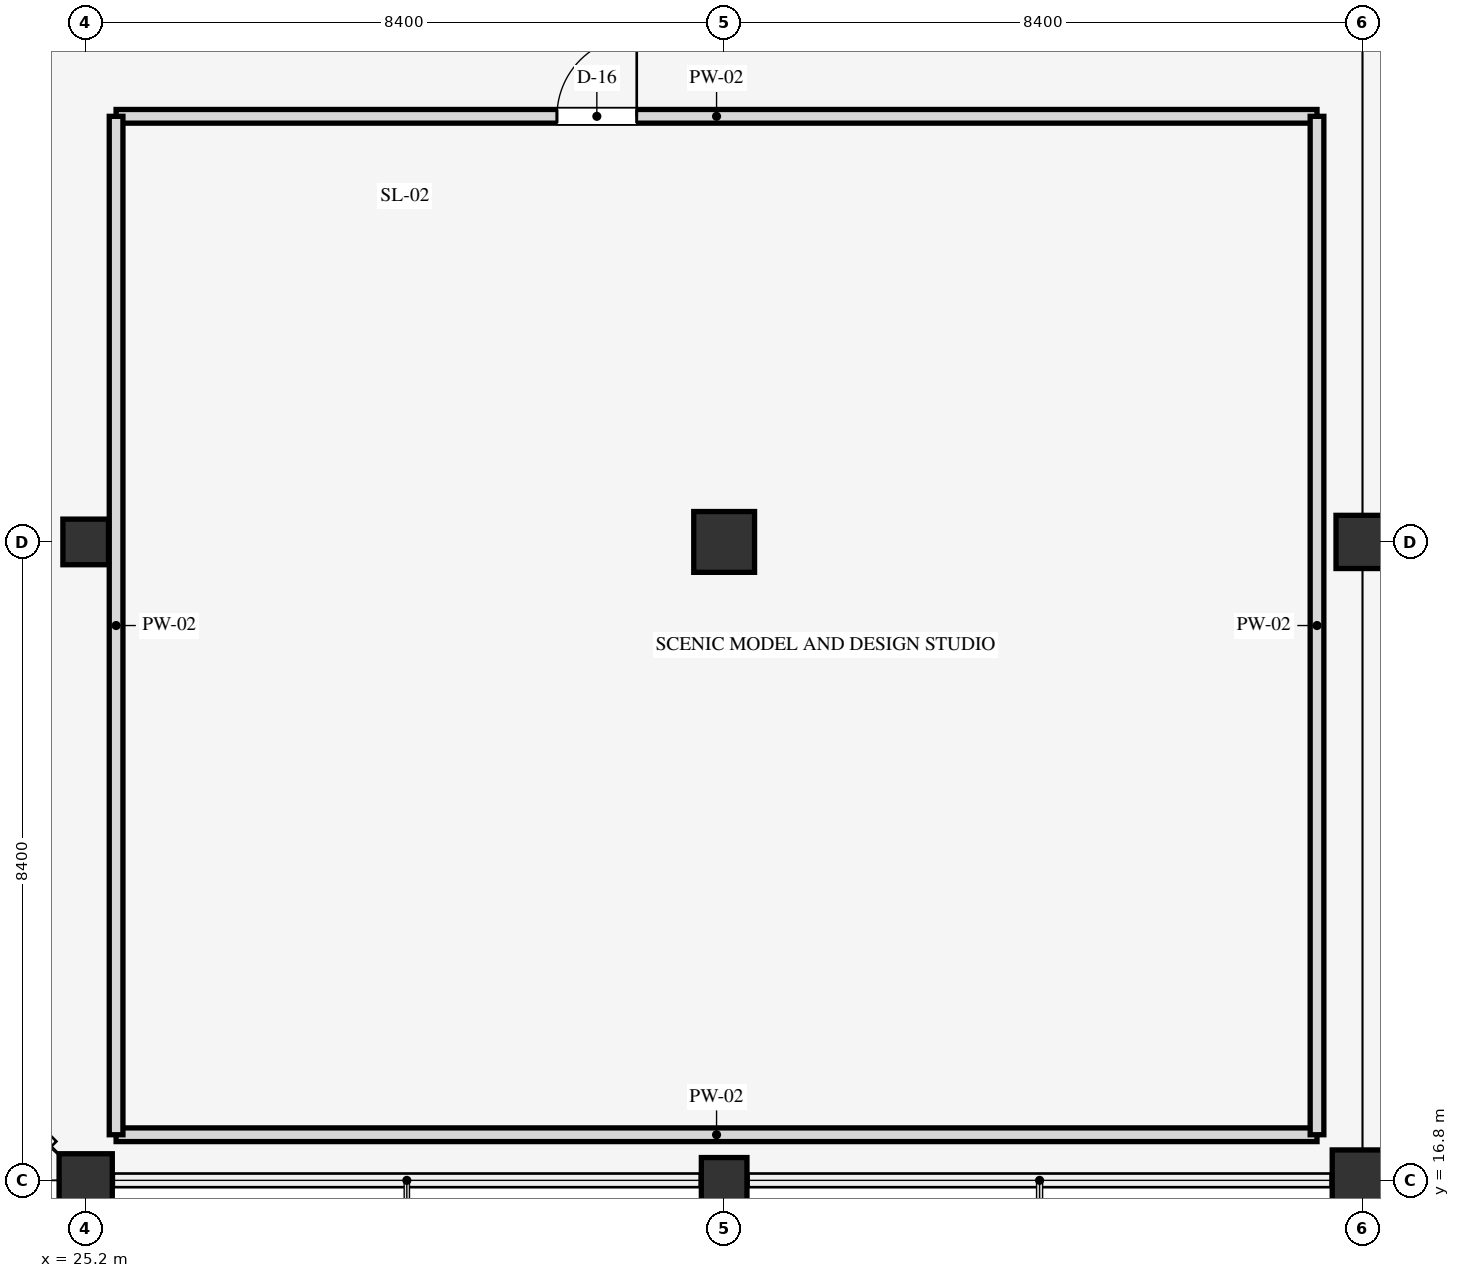
"""IFC4 building model, lengths in metres.
Left out: names, types, materials, properties, quantities, classifications, styles, units other than length and angle.
Written with IfcOpenShell. Run it as: python <this file> out.ifc"""

import sys

from ifc_helpers import new_model, si_unit, direction, frame, frame_2d, origin, origin_2d, place, context, subcontext, project, spatial, rectangle, extrude, element, fill, save


model = new_model("IFC4")
c1 = context("Model", 3, precision=1e-05, world=origin(), true_north=direction((0.0, 1.0)))
c2 = subcontext(c1, "Body", "Model", "MODEL_VIEW")
j1 = project(units=[si_unit("LENGTHUNIT", "METRE"), si_unit("PLANEANGLEUNIT", "RADIAN")], contexts=[c1])
p1 = place(None, origin())
s1 = spatial("IfcSite", under=j1, at=p1, CompositionType="ELEMENT")
p2 = place(p1, origin())
s2 = spatial("IfcBuilding", under=s1, at=p2, CompositionType="ELEMENT")
p3 = place(p2, frame((0.0, 0.0, 18.9)))
s3 = spatial("IfcBuildingStorey", under=s2, at=p3, CompositionType="ELEMENT", Elevation=18.9)
p4 = place(p3, frame((25.2, 16.8, 0.0), z_axis=(0.0, 0.0, 1.0), x_axis=(1.0, 0.0, 0.0)))
e1 = element("IfcColumn", 1, at=p4, inside=s3, PredefinedType="COLUMN", context=c2, shape_type="SweptSolid", body=[
    extrude(rectangle(XDim=0.7, YDim=0.7, at=origin_2d()), origin(), (0.0, 0.0, 1.0), 4.5),
])
for number, where, z_axis, x_axis in (
    (2, (25.2, 25.2, 0.0), (0.0, 0.0, 1.0), (1.0, 0.0, 0.0)),
    (3, (33.6, 16.8, 0.0), (0.0, 0.0, 1.0), (1.0, 0.0, 0.0)),
):
    element("IfcColumn", number, at=place(p3, frame(where, z_axis=z_axis, x_axis=x_axis)), inside=s3, PredefinedType="COLUMN", context=c2, shape_type="SweptSolid", body=[
        extrude(rectangle(XDim=0.6, YDim=0.6, at=origin_2d()), origin(), (0.0, 0.0, 1.0), 4.5),
    ])
for number, where, z_axis, x_axis in (
    (4, (33.6, 25.2, 0.0), (0.0, 0.0, 1.0), (1.0, 0.0, 0.0)),
    (5, (42.0, 16.8, 0.0), (0.0, 0.0, 1.0), (1.0, 0.0, 0.0)),
):
    element("IfcColumn", number, at=place(p3, frame(where, z_axis=z_axis, x_axis=x_axis)), inside=s3, PredefinedType="COLUMN", context=c2, shape_type="SweptSolid", body=[
        extrude(rectangle(XDim=0.8, YDim=0.8, at=origin_2d()), origin(), (0.0, 0.0, 1.0), 4.5),
    ])
p5 = place(p3, frame((42.0, 25.2, 0.0), z_axis=(0.0, 0.0, 1.0), x_axis=(1.0, 0.0, 0.0)))
e6 = element("IfcColumn", 6, at=p5, inside=s3, PredefinedType="COLUMN", context=c2, shape_type="SweptSolid", body=[
    extrude(rectangle(XDim=0.7, YDim=0.7, at=origin_2d()), origin(), (0.0, 0.0, 1.0), 4.5),
])
p6 = place(p3, frame((25.6, 17.4, 0.0), z_axis=(0.0, 0.0, 1.0), x_axis=(1.0, 0.0, 0.0)))
e7 = element("IfcWall", 7, at=p6, inside=s3, PredefinedType="PARTITIONING", context=c2, shape_type="SweptSolid", body=[
    extrude(rectangle(XDim=15.8, YDim=0.18, at=frame_2d((7.9, 0.0))), origin(), (0.0, 0.0, 1.0), 3.54),
])
p7 = place(p3, frame((25.6, 30.8, 0.0), z_axis=(0.0, 0.0, 1.0), x_axis=(1.0, 0.0, 0.0)))
e8 = element("IfcWall", 8, at=p7, inside=s3, PredefinedType="PARTITIONING", context=c2, shape_type="SweptSolid", body=[
    extrude(rectangle(XDim=15.8, YDim=0.18, at=frame_2d((7.9, 0.0))), origin(), (0.0, 0.0, 1.0), 3.54),
])
p8 = place(p7, frame((5.8, 0.0, 0.0)))
e9 = element("IfcOpeningElement", 9, at=p8, cuts=e8, PredefinedType="OPENING", context=c2, shape_type="SweptSolid", body=[
    extrude(rectangle(XDim=1.05, YDim=2.16, at=frame_2d((0.525, 1.08))), frame((0.0, 0.1, 0.0), z_axis=(0.0, -1.0, 0.0), x_axis=(1.0, 0.0, 0.0)), (0.0, 0.0, 1.0), 0.2),
])
for number, where, z_axis, x_axis in (
    (10, (25.6, 17.4, 0.0), (0.0, 0.0, 1.0), (0.0, 1.0, 0.0)),
    (11, (41.4, 17.4, 0.0), (0.0, 0.0, 1.0), (0.0, 1.0, 0.0)),
):
    element("IfcWall", number, at=place(p3, frame(where, z_axis=z_axis, x_axis=x_axis)), inside=s3, PredefinedType="PARTITIONING", context=c2, shape_type="SweptSolid", body=[
        extrude(rectangle(XDim=13.4, YDim=0.18, at=frame_2d((6.7, 0.0))), origin(), (0.0, 0.0, 1.0), 3.54),
    ])
p9 = place(p8, origin())
e12 = element("IfcDoor", 12, at=p9, inside=s3, OperationType="SINGLE_SWING_RIGHT", PredefinedType="DOOR", context=c2, shape_type="SweptSolid", body=[
    extrude(rectangle(XDim=1.05, YDim=2.16, at=frame_2d((0.525, 1.08))), frame((0.0, 0.025, 0.0), z_axis=(0.0, -1.0, 0.0), x_axis=(1.0, 0.0, 0.0)), (0.0, 0.0, 1.0), 0.05),
])
fill(e9, e12)
save(model, sys.argv[1])
